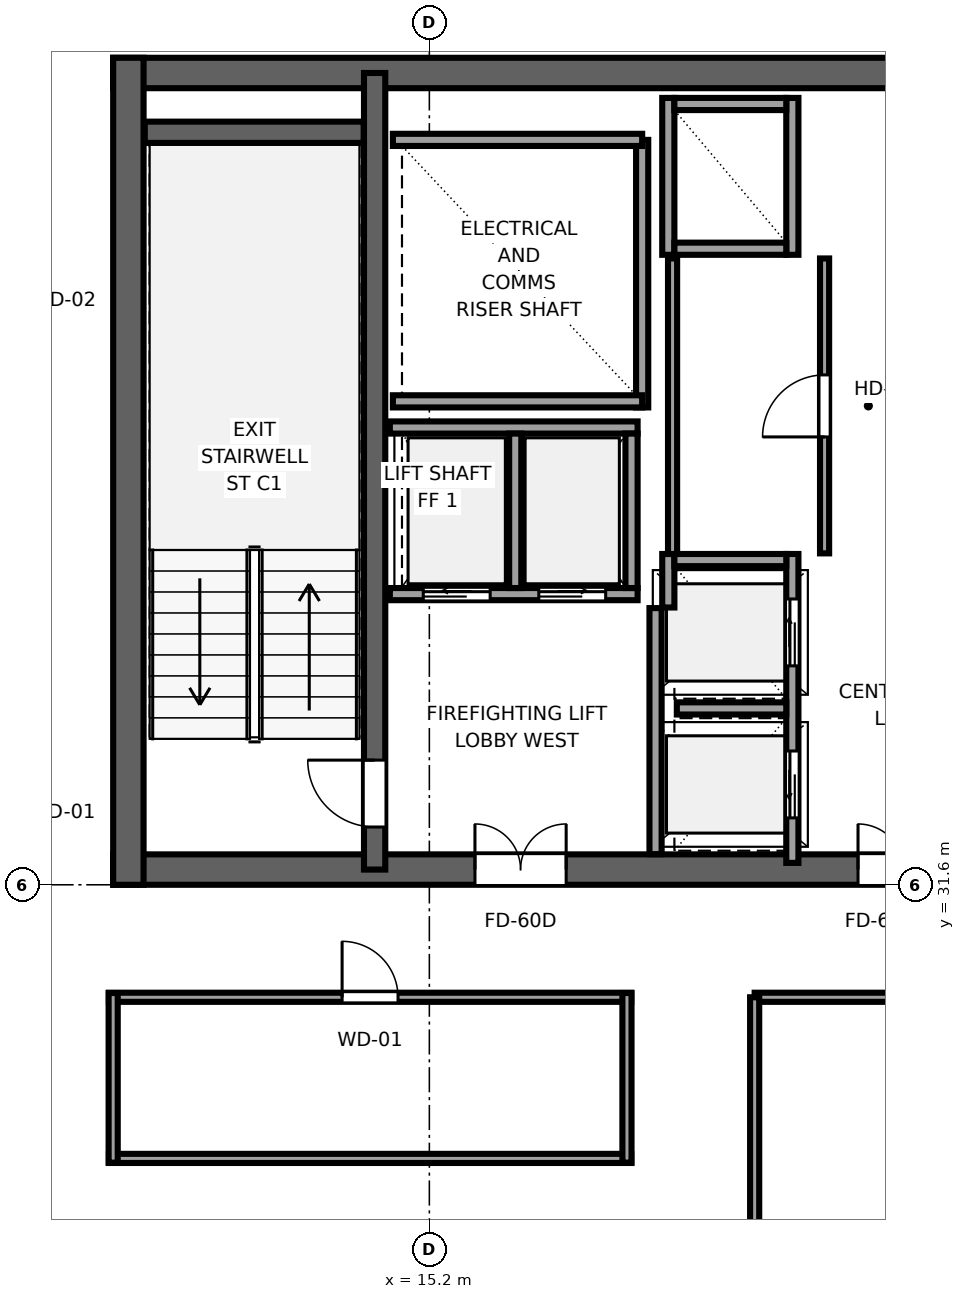
"""IFC4 building model, lengths in metres.
Left out: names, types, materials, properties, quantities, classifications, styles, units other than length and angle.
Written with IfcOpenShell. Run it as: python <this file> out.ifc"""

import sys

from ifc_helpers import new_model, si_unit, direction, frame, frame_2d, origin, place, context, subcontext, project, spatial, rectangle, extrude, source, transform, mapped, element, fill, save


model = new_model("IFC4")
c1 = context("Model", 3, precision=1e-05, world=origin(), true_north=direction((0.0, 1.0)))
c2 = subcontext(c1, "Body", "Model", "MODEL_VIEW")
j1 = project(units=[si_unit("LENGTHUNIT", "METRE"), si_unit("PLANEANGLEUNIT", "RADIAN")], contexts=[c1])
p1 = place(None, origin())
s1 = spatial("IfcSite", under=j1, at=p1, CompositionType="ELEMENT")
p2 = place(p1, origin())
s2 = spatial("IfcBuilding", under=s1, at=p2, CompositionType="ELEMENT")
p3 = place(p2, frame((0.0, 0.0, 238.1)))
s3 = spatial("IfcBuildingStorey", under=s2, at=p3, CompositionType="ELEMENT", Elevation=238.1)
p4 = place(p3, frame((10.0, 31.85, 0.0), z_axis=(0.0, 0.0, 1.0), x_axis=(1.0, 0.0, 0.0)))
e1 = element("IfcWall", 1, at=p4, inside=s3, PredefinedType="SHEAR", context=c2, shape_type="SweptSolid", body=[
    extrude(rectangle(XDim=26.0, YDim=0.5, at=frame_2d((13.0, 0.0))), origin(), (0.0, 0.0, 1.0), 3.55),
])
p5 = place(p4, frame((7.45, 0.0, 0.0), z_axis=(0.0, 0.0, 1.0), x_axis=(-1.0, 0.0, 0.0)))
e2 = element("IfcOpeningElement", 2, at=p5, cuts=e1, PredefinedType="OPENING", context=c2, shape_type="SweptSolid", body=[
    extrude(rectangle(XDim=1.5, YDim=2.04, at=frame_2d((0.75, 1.02))), frame((0.0, 0.26, 0.0), z_axis=(0.0, -1.0, 0.0), x_axis=(1.0, 0.0, 0.0)), (0.0, 0.0, 1.0), 0.52),
])
p6 = place(p4, frame((13.75, 0.0, 0.0), z_axis=(0.0, 0.0, 1.0), x_axis=(-1.0, 0.0, 0.0)))
e3 = element("IfcOpeningElement", 3, at=p6, cuts=e1, PredefinedType="OPENING", context=c2, shape_type="SweptSolid", body=[
    extrude(rectangle(XDim=1.5, YDim=2.04, at=frame_2d((0.75, 1.02))), frame((0.0, 0.26, 0.0), z_axis=(0.0, -1.0, 0.0), x_axis=(1.0, 0.0, 0.0)), (0.0, 0.0, 1.0), 0.52),
])
p7 = place(p4, frame((20.05, 0.0, 0.0), z_axis=(0.0, 0.0, 1.0), x_axis=(-1.0, 0.0, 0.0)))
e4 = element("IfcOpeningElement", 4, at=p7, cuts=e1, PredefinedType="OPENING", context=c2, shape_type="SweptSolid", body=[
    extrude(rectangle(XDim=1.5, YDim=2.04, at=frame_2d((0.75, 1.02))), frame((0.0, 0.26, 0.0), z_axis=(0.0, -1.0, 0.0), x_axis=(1.0, 0.0, 0.0)), (0.0, 0.0, 1.0), 0.52),
])
p8 = place(p3, frame((10.0, 44.95, 0.0), z_axis=(0.0, 0.0, 1.0), x_axis=(1.0, 0.0, 0.0)))
e5 = element("IfcWall", 5, at=p8, inside=s3, PredefinedType="SHEAR", context=c2, shape_type="SweptSolid", body=[
    extrude(rectangle(XDim=26.0, YDim=0.5, at=frame_2d((13.0, 0.0))), origin(), (0.0, 0.0, 1.0), 3.55),
])
p9 = place(p3, frame((10.25, 31.6, 0.0), z_axis=(0.0, 0.0, 1.0), x_axis=(0.0, 1.0, 0.0)))
e6 = element("IfcWall", 6, at=p9, inside=s3, PredefinedType="SHEAR", context=c2, shape_type="SweptSolid", body=[
    extrude(rectangle(XDim=13.6, YDim=0.5, at=frame_2d((6.8, 0.0))), origin(), (0.0, 0.0, 1.0), 3.55),
])
p10 = place(p3, frame((14.3, 31.85, 0.0), z_axis=(0.0, 0.0, 1.0), x_axis=(0.0, 1.0, 0.0)))
e7 = element("IfcWall", 7, at=p10, inside=s3, PredefinedType="SHEAR", context=c2, shape_type="SweptSolid", body=[
    extrude(rectangle(XDim=13.1, YDim=0.35, at=frame_2d((6.55, 0.0))), origin(), (0.0, 0.0, 1.0), 3.55),
])
p11 = place(p10, frame((0.7, 0.0, 0.0)))
e8 = element("IfcOpeningElement", 8, at=p11, cuts=e7, PredefinedType="OPENING", context=c2, shape_type="SweptSolid", body=[
    extrude(rectangle(XDim=1.1, YDim=2.12, at=frame_2d((0.55, 1.06))), frame((0.0, 0.185, 0.0), z_axis=(0.0, -1.0, 0.0), x_axis=(1.0, 0.0, 0.0)), (0.0, 0.0, 1.0), 0.37),
])
p12 = place(p3, frame((10.52, 43.975, 0.0), z_axis=(0.0, 0.0, 1.0), x_axis=(1.0, 0.0, 0.0)))
e9 = element("IfcWall", 9, at=p12, inside=s3, PredefinedType="SHEAR", context=c2, shape_type="SweptSolid", body=[
    extrude(rectangle(XDim=3.6, YDim=0.35, at=frame_2d((1.8, 0.0))), origin(), (0.0, 0.0, 1.0), 3.55),
])
p13 = place(p3, frame((18.7, 39.45, 0.0), z_axis=(0.0, 0.0, 1.0), x_axis=(0.0, 1.0, 0.0)))
e10 = element("IfcWall", 10, at=p13, inside=s3, PredefinedType="SOLIDWALL", context=c2, shape_type="SweptSolid", body=[
    extrude(rectangle(XDim=4.4, YDim=0.2, at=frame_2d((2.2, 0.0))), origin(), (0.0, 0.0, 1.0), 3.29),
])
for number, where, z_axis, x_axis in (
    (11, (14.6, 39.55, 0.0), (0.0, 0.0, 1.0), (1.0, 0.0, 0.0)),
    (12, (14.6, 43.85, 0.0), (0.0, 0.0, 1.0), (1.0, 0.0, 0.0)),
):
    element("IfcWall", number, at=place(p3, frame(where, z_axis=z_axis, x_axis=x_axis)), inside=s3, PredefinedType="SOLIDWALL", context=c2, shape_type="SweptSolid", body=[
        extrude(rectangle(XDim=4.1, YDim=0.2, at=frame_2d((2.05, 0.0))), origin(), (0.0, 0.0, 1.0), 3.29),
    ])
p14 = place(p3, frame((18.92, 32.104, 0.0), z_axis=(0.0, 0.0, 1.0), x_axis=(0.0, 1.0, 0.0)))
e13 = element("IfcWall", 13, at=p14, inside=s3, PredefinedType="SOLIDWALL", context=c2, shape_type="SweptSolid", body=[
    extrude(rectangle(XDim=4.046, YDim=0.2, at=frame_2d((2.023, 0.0))), origin(), (0.0, 0.0, 1.0), 3.29),
])
p15 = place(p3, frame((21.17, 31.96, 0.0), z_axis=(0.0, 0.0, 1.0), x_axis=(0.0, 1.0, 0.0)))
e14 = element("IfcWall", 14, at=p15, inside=s3, PredefinedType="SOLIDWALL", context=c2, shape_type="SweptSolid", body=[
    extrude(rectangle(XDim=5.08, YDim=0.2, at=frame_2d((2.54, 0.0))), origin(), (0.0, 0.0, 1.0), 3.29),
])
p16 = place(p15, frame((0.74, 0.0, 0.0)))
e15 = element("IfcOpeningElement", 15, at=p16, cuts=e14, PredefinedType="OPENING", context=c2, shape_type="SweptSolid", body=[
    extrude(rectangle(XDim=1.1, YDim=2.12, at=frame_2d((0.55, 1.06))), frame((0.0, 0.11, 0.0), z_axis=(0.0, -1.0, 0.0), x_axis=(1.0, 0.0, 0.0)), (0.0, 0.0, 1.0), 0.22),
])
p17 = place(p15, frame((3.24, 0.0, 0.0)))
e16 = element("IfcOpeningElement", 16, at=p17, cuts=e14, PredefinedType="OPENING", context=c2, shape_type="SweptSolid", body=[
    extrude(rectangle(XDim=1.1, YDim=2.12, at=frame_2d((0.55, 1.06))), frame((0.0, 0.11, 0.0), z_axis=(0.0, -1.0, 0.0), x_axis=(1.0, 0.0, 0.0)), (0.0, 0.0, 1.0), 0.22),
])
p18 = place(p3, frame((19.13, 36.16, 0.0), z_axis=(0.0, 0.0, 1.0), x_axis=(0.0, 1.0, 0.0)))
e17 = element("IfcWall", 17, at=p18, inside=s3, PredefinedType="SOLIDWALL", context=c2, shape_type="SweptSolid", body=[
    extrude(rectangle(XDim=0.88, YDim=0.2, at=frame_2d((0.44, 0.0))), origin(), (0.0, 0.0, 1.0), 3.29),
])
p19 = place(p3, frame((19.23, 36.94, 0.0), z_axis=(0.0, 0.0, 1.0), x_axis=(1.0, 0.0, 0.0)))
e18 = element("IfcWall", 18, at=p19, inside=s3, PredefinedType="SOLIDWALL", context=c2, shape_type="SweptSolid", body=[
    extrude(rectangle(XDim=1.84, YDim=0.2, at=frame_2d((0.92, 0.0))), origin(), (0.0, 0.0, 1.0), 3.29),
])
p20 = place(p3, frame((19.27, 34.5, 0.0), z_axis=(0.0, 0.0, 1.0), x_axis=(1.0, 0.0, 0.0)))
e19 = element("IfcWall", 19, at=p20, inside=s3, PredefinedType="SOLIDWALL", context=c2, shape_type="SweptSolid", body=[
    extrude(rectangle(XDim=1.8, YDim=0.2, at=frame_2d((0.9, 0.0))), origin(), (0.0, 0.0, 1.0), 3.29),
])
for number, where, z_axis, x_axis in (
    (20, (21.17, 41.96, 0.0), (0.0, 0.0, 1.0), (0.0, 1.0, 0.0)),
    (21, (19.13, 41.96, 0.0), (0.0, 0.0, 1.0), (0.0, 1.0, 0.0)),
):
    element("IfcWall", number, at=place(p3, frame(where, z_axis=z_axis, x_axis=x_axis)), inside=s3, PredefinedType="SOLIDWALL", context=c2, shape_type="SweptSolid", body=[
        extrude(rectangle(XDim=2.58, YDim=0.2, at=frame_2d((1.29, 0.0))), origin(), (0.0, 0.0, 1.0), 3.29),
    ])
for number, where, z_axis, x_axis in (
    (22, (19.23, 42.06, 0.0), (0.0, 0.0, 1.0), (1.0, 0.0, 0.0)),
    (23, (19.23, 44.44, 0.0), (0.0, 0.0, 1.0), (1.0, 0.0, 0.0)),
):
    element("IfcWall", number, at=place(p3, frame(where, z_axis=z_axis, x_axis=x_axis)), inside=s3, PredefinedType="SOLIDWALL", context=c2, shape_type="SweptSolid", body=[
        extrude(rectangle(XDim=1.84, YDim=0.2, at=frame_2d((0.92, 0.0))), origin(), (0.0, 0.0, 1.0), 3.29),
    ])
p21 = place(p3, frame((14.55, 36.38, 0.0), z_axis=(0.0, 0.0, 1.0), x_axis=(1.0, 0.0, 0.0)))
e24 = element("IfcWall", 24, at=p21, inside=s3, PredefinedType="SOLIDWALL", context=c2, shape_type="SweptSolid", body=[
    extrude(rectangle(XDim=4.075, YDim=0.2, at=frame_2d((2.038, 0.0))), origin(), (0.0, 0.0, 1.0), 3.29),
])
p22 = place(p21, frame((0.55, 0.0, 0.0)))
e25 = element("IfcOpeningElement", 25, at=p22, cuts=e24, PredefinedType="OPENING", context=c2, shape_type="SweptSolid", body=[
    extrude(rectangle(XDim=1.1, YDim=2.12, at=frame_2d((0.55, 1.06))), frame((0.0, 0.11, 0.0), z_axis=(0.0, -1.0, 0.0), x_axis=(1.0, 0.0, 0.0)), (0.0, 0.0, 1.0), 0.22),
])
p23 = place(p21, frame((2.45, 0.0, 0.0)))
e26 = element("IfcOpeningElement", 26, at=p23, cuts=e24, PredefinedType="OPENING", context=c2, shape_type="SweptSolid", body=[
    extrude(rectangle(XDim=1.1, YDim=2.12, at=frame_2d((0.55, 1.06))), frame((0.0, 0.11, 0.0), z_axis=(0.0, -1.0, 0.0), x_axis=(1.0, 0.0, 0.0)), (0.0, 0.0, 1.0), 0.22),
])
p24 = place(p3, frame((14.55, 39.12, 0.0), z_axis=(0.0, 0.0, 1.0), x_axis=(1.0, 0.0, 0.0)))
e27 = element("IfcWall", 27, at=p24, inside=s3, PredefinedType="SOLIDWALL", context=c2, shape_type="SweptSolid", body=[
    extrude(rectangle(XDim=4.075, YDim=0.2, at=frame_2d((2.038, 0.0))), origin(), (0.0, 0.0, 1.0), 3.29),
])
for number, where, z_axis, x_axis in (
    (28, (18.525, 36.48, 0.0), (0.0, 0.0, 1.0), (0.0, 1.0, 0.0)),
    (29, (16.613, 36.48, 0.0), (0.0, 0.0, 1.0), (0.0, 1.0, 0.0)),
):
    element("IfcWall", number, at=place(p3, frame(where, z_axis=z_axis, x_axis=x_axis)), inside=s3, PredefinedType="SOLIDWALL", context=c2, shape_type="SweptSolid", body=[
        extrude(rectangle(XDim=2.54, YDim=0.2, at=frame_2d((1.27, 0.0))), origin(), (0.0, 0.0, 1.0), 3.29),
    ])
p25 = place(p3, frame((21.7, 37.05, 0.0), z_axis=(0.0, 0.0, 1.0), x_axis=(0.0, 1.0, 0.0)))
e30 = element("IfcWall", 30, at=p25, inside=s3, PredefinedType="PARTITIONING", context=c2, shape_type="SweptSolid", body=[
    extrude(rectangle(XDim=4.85, YDim=0.15, at=frame_2d((2.425, 0.0))), origin(), (0.0, 0.0, 1.0), 3.29),
])
p26 = place(p25, frame((1.915, 0.0, 0.0)))
e31 = element("IfcOpeningElement", 31, at=p26, cuts=e30, PredefinedType="OPENING", context=c2, shape_type="SweptSolid", body=[
    extrude(rectangle(XDim=1.02, YDim=2.03, at=frame_2d((0.51, 1.015))), frame((0.0, 0.085, 0.0), z_axis=(0.0, -1.0, 0.0), x_axis=(1.0, 0.0, 0.0)), (0.0, 0.0, 1.0), 0.17),
])
p27 = place(p3, frame((19.2, 37.04, 0.0), z_axis=(0.0, 0.0, 1.0), x_axis=(0.0, 1.0, 0.0)))
e32 = element("IfcWall", 32, at=p27, inside=s3, PredefinedType="PARTITIONING", context=c2, shape_type="SweptSolid", body=[
    extrude(rectangle(XDim=4.86, YDim=0.15, at=frame_2d((2.43, 0.0))), origin(), (0.0, 0.0, 1.0), 3.29),
])
p28 = place(p3, frame((9.93, 27.1, 0.0), z_axis=(0.0, 0.0, 1.0), x_axis=(1.0, 0.0, 0.0)))
e33 = element("IfcWall", 33, at=p28, inside=s3, PredefinedType="PARTITIONING", context=c2, shape_type="SweptSolid", body=[
    extrude(rectangle(XDim=8.59, YDim=0.15, at=frame_2d((4.295, 0.0))), origin(), (0.0, 0.0, 1.0), 3.29),
])
p29 = place(p3, frame((9.93, 29.75, 0.0), z_axis=(0.0, 0.0, 1.0), x_axis=(1.0, 0.0, 0.0)))
e34 = element("IfcWall", 34, at=p29, inside=s3, PredefinedType="PARTITIONING", context=c2, shape_type="SweptSolid", body=[
    extrude(rectangle(XDim=8.59, YDim=0.15, at=frame_2d((4.295, 0.0))), origin(), (0.0, 0.0, 1.0), 3.29),
])
p30 = place(p29, frame((3.835, 0.0, 0.0)))
e35 = element("IfcOpeningElement", 35, at=p30, cuts=e34, PredefinedType="OPENING", context=c2, shape_type="SweptSolid", body=[
    extrude(rectangle(XDim=0.92, YDim=2.01, at=frame_2d((0.46, 1.005))), frame((0.0, 0.085, 0.0), z_axis=(0.0, -1.0, 0.0), x_axis=(1.0, 0.0, 0.0)), (0.0, 0.0, 1.0), 0.17),
])
for number, where, z_axis, x_axis in (
    (36, (10.0, 27.03, 0.0), (0.0, 0.0, 1.0), (0.0, 1.0, 0.0)),
    (37, (18.45, 27.03, 0.0), (0.0, 0.0, 1.0), (0.0, 1.0, 0.0)),
):
    element("IfcWall", number, at=place(p3, frame(where, z_axis=z_axis, x_axis=x_axis)), inside=s3, PredefinedType="PARTITIONING", context=c2, shape_type="SweptSolid", body=[
        extrude(rectangle(XDim=2.79, YDim=0.15, at=frame_2d((1.395, 0.0))), origin(), (0.0, 0.0, 1.0), 3.29),
    ])
p31 = place(p3, frame((20.55, 29.75, 0.0), z_axis=(0.0, 0.0, 1.0), x_axis=(1.0, 0.0, 0.0)))
e38 = element("IfcWall", 38, at=p31, inside=s3, PredefinedType="PARTITIONING", context=c2, shape_type="SweptSolid", body=[
    extrude(rectangle(XDim=7.85, YDim=0.15, at=frame_2d((3.925, 0.0))), origin(), (0.0, 0.0, 1.0), 3.29),
])
p32 = place(p31, frame((3.1, 0.0, 0.0)))
e39 = element("IfcOpeningElement", 39, at=p32, cuts=e38, PredefinedType="OPENING", context=c2, shape_type="SweptSolid", body=[
    extrude(rectangle(XDim=1.65, YDim=2.15, at=frame_2d((0.825, 1.075))), frame((0.0, 0.085, 0.0), z_axis=(0.0, -1.0, 0.0), x_axis=(1.0, 0.0, 0.0)), (0.0, 0.0, 1.0), 0.17),
])
p33 = place(p3, frame((20.55, 25.0, 0.0), z_axis=(0.0, 0.0, 1.0), x_axis=(0.0, 1.0, 0.0)))
e40 = element("IfcWall", 40, at=p33, inside=s3, PredefinedType="PARTITIONING", context=c2, shape_type="SweptSolid", body=[
    extrude(rectangle(XDim=4.75, YDim=0.15, at=frame_2d((2.375, 0.0))), origin(), (0.0, 0.0, 1.0), 3.29),
])
m1 = source(origin(), c2, "Body", "SweptSolid", [
    extrude(rectangle(XDim=1.1, YDim=2.12, at=frame_2d((0.55, 1.06))), frame((0.0, 0.025, 0.0), z_axis=(0.0, -1.0, 0.0), x_axis=(1.0, 0.0, 0.0)), (0.0, 0.0, 1.0), 0.05),
])
p34 = place(p11, origin())
e41 = element("IfcDoor", 41, at=p34, inside=s3, OperationType="SINGLE_SWING_RIGHT", PredefinedType="DOOR", context=c2, shape_type="MappedRepresentation", body=[
    mapped(m1, transform((0.0, 0.0, 0.0), x_axis=(1.0, 0.0, 0.0), y_axis=(0.0, 1.0, 0.0), z_axis=(0.0, 0.0, 1.0), scale=1.0)),
])
fill(e8, e41)
m2 = source(origin(), c2, "Body", "SweptSolid", [
    extrude(rectangle(XDim=1.5, YDim=2.04, at=frame_2d((0.75, 1.02))), frame((0.0, 0.025, 0.0), z_axis=(0.0, -1.0, 0.0), x_axis=(1.0, 0.0, 0.0)), (0.0, 0.0, 1.0), 0.05),
])
p35 = place(p5, origin())
e42 = element("IfcDoor", 42, at=p35, inside=s3, OperationType="DOUBLE_DOOR_SINGLE_SWING", PredefinedType="DOOR", context=c2, shape_type="MappedRepresentation", body=[
    mapped(m2, transform((0.0, 0.0, 0.0), x_axis=(1.0, 0.0, 0.0), y_axis=(0.0, 1.0, 0.0), z_axis=(0.0, 0.0, 1.0), scale=1.0)),
])
fill(e2, e42)
p36 = place(p6, origin())
e43 = element("IfcDoor", 43, at=p36, inside=s3, OperationType="DOUBLE_DOOR_SINGLE_SWING", PredefinedType="DOOR", context=c2, shape_type="MappedRepresentation", body=[
    mapped(m2, transform((0.0, 0.0, 0.0), x_axis=(1.0, 0.0, 0.0), y_axis=(0.0, 1.0, 0.0), z_axis=(0.0, 0.0, 1.0), scale=1.0)),
])
fill(e3, e43)
m3 = source(origin(), c2, "Body", "SweptSolid", [
    extrude(rectangle(XDim=1.1, YDim=2.12, at=frame_2d((0.55, 1.06))), frame((0.0, 0.025, 0.0), z_axis=(0.0, -1.0, 0.0), x_axis=(1.0, 0.0, 0.0)), (0.0, 0.0, 1.0), 0.05),
])
p37 = place(p16, origin())
e44 = element("IfcDoor", 44, at=p37, inside=s3, OperationType="SLIDING_TO_LEFT", PredefinedType="DOOR", context=c2, shape_type="MappedRepresentation", body=[
    mapped(m3, transform((0.0, 0.0, 0.0), x_axis=(1.0, 0.0, 0.0), y_axis=(0.0, 1.0, 0.0), z_axis=(0.0, 0.0, 1.0), scale=1.0)),
])
fill(e15, e44)
p38 = place(p17, origin())
e45 = element("IfcDoor", 45, at=p38, inside=s3, OperationType="SLIDING_TO_RIGHT", PredefinedType="DOOR", context=c2, shape_type="MappedRepresentation", body=[
    mapped(m3, transform((0.0, 0.0, 0.0), x_axis=(1.0, 0.0, 0.0), y_axis=(0.0, 1.0, 0.0), z_axis=(0.0, 0.0, 1.0), scale=1.0)),
])
fill(e16, e45)
p39 = place(p22, origin())
e46 = element("IfcDoor", 46, at=p39, inside=s3, OperationType="SLIDING_TO_LEFT", PredefinedType="DOOR", context=c2, shape_type="MappedRepresentation", body=[
    mapped(m3, transform((0.0, 0.0, 0.0), x_axis=(1.0, 0.0, 0.0), y_axis=(0.0, 1.0, 0.0), z_axis=(0.0, 0.0, 1.0), scale=1.0)),
])
fill(e25, e46)
p40 = place(p23, origin())
e47 = element("IfcDoor", 47, at=p40, inside=s3, OperationType="SLIDING_TO_RIGHT", PredefinedType="DOOR", context=c2, shape_type="MappedRepresentation", body=[
    mapped(m3, transform((0.0, 0.0, 0.0), x_axis=(1.0, 0.0, 0.0), y_axis=(0.0, 1.0, 0.0), z_axis=(0.0, 0.0, 1.0), scale=1.0)),
])
fill(e26, e47)
m4 = source(origin(), c2, "Body", "SweptSolid", [
    extrude(rectangle(XDim=1.02, YDim=2.03, at=frame_2d((0.51, 1.015))), frame((0.0, 0.025, 0.0), z_axis=(0.0, -1.0, 0.0), x_axis=(1.0, 0.0, 0.0)), (0.0, 0.0, 1.0), 0.05),
])
p41 = place(p26, origin())
e48 = element("IfcDoor", 48, at=p41, inside=s3, OperationType="SINGLE_SWING_LEFT", PredefinedType="DOOR", context=c2, shape_type="MappedRepresentation", body=[
    mapped(m4, transform((0.0, 0.0, 0.0), x_axis=(1.0, 0.0, 0.0), y_axis=(0.0, 1.0, 0.0), z_axis=(0.0, 0.0, 1.0), scale=1.0)),
])
fill(e31, e48)
m5 = source(origin(), c2, "Body", "SweptSolid", [
    extrude(rectangle(XDim=0.92, YDim=2.01, at=frame_2d((0.46, 1.005))), frame((0.0, 0.025, 0.0), z_axis=(0.0, -1.0, 0.0), x_axis=(1.0, 0.0, 0.0)), (0.0, 0.0, 1.0), 0.05),
])
p42 = place(p30, origin())
e49 = element("IfcDoor", 49, at=p42, inside=s3, OperationType="SINGLE_SWING_LEFT", PredefinedType="DOOR", context=c2, shape_type="MappedRepresentation", body=[
    mapped(m5, transform((0.0, 0.0, 0.0), x_axis=(1.0, 0.0, 0.0), y_axis=(0.0, 1.0, 0.0), z_axis=(0.0, 0.0, 1.0), scale=1.0)),
])
fill(e35, e49)
save(model, sys.argv[1])
